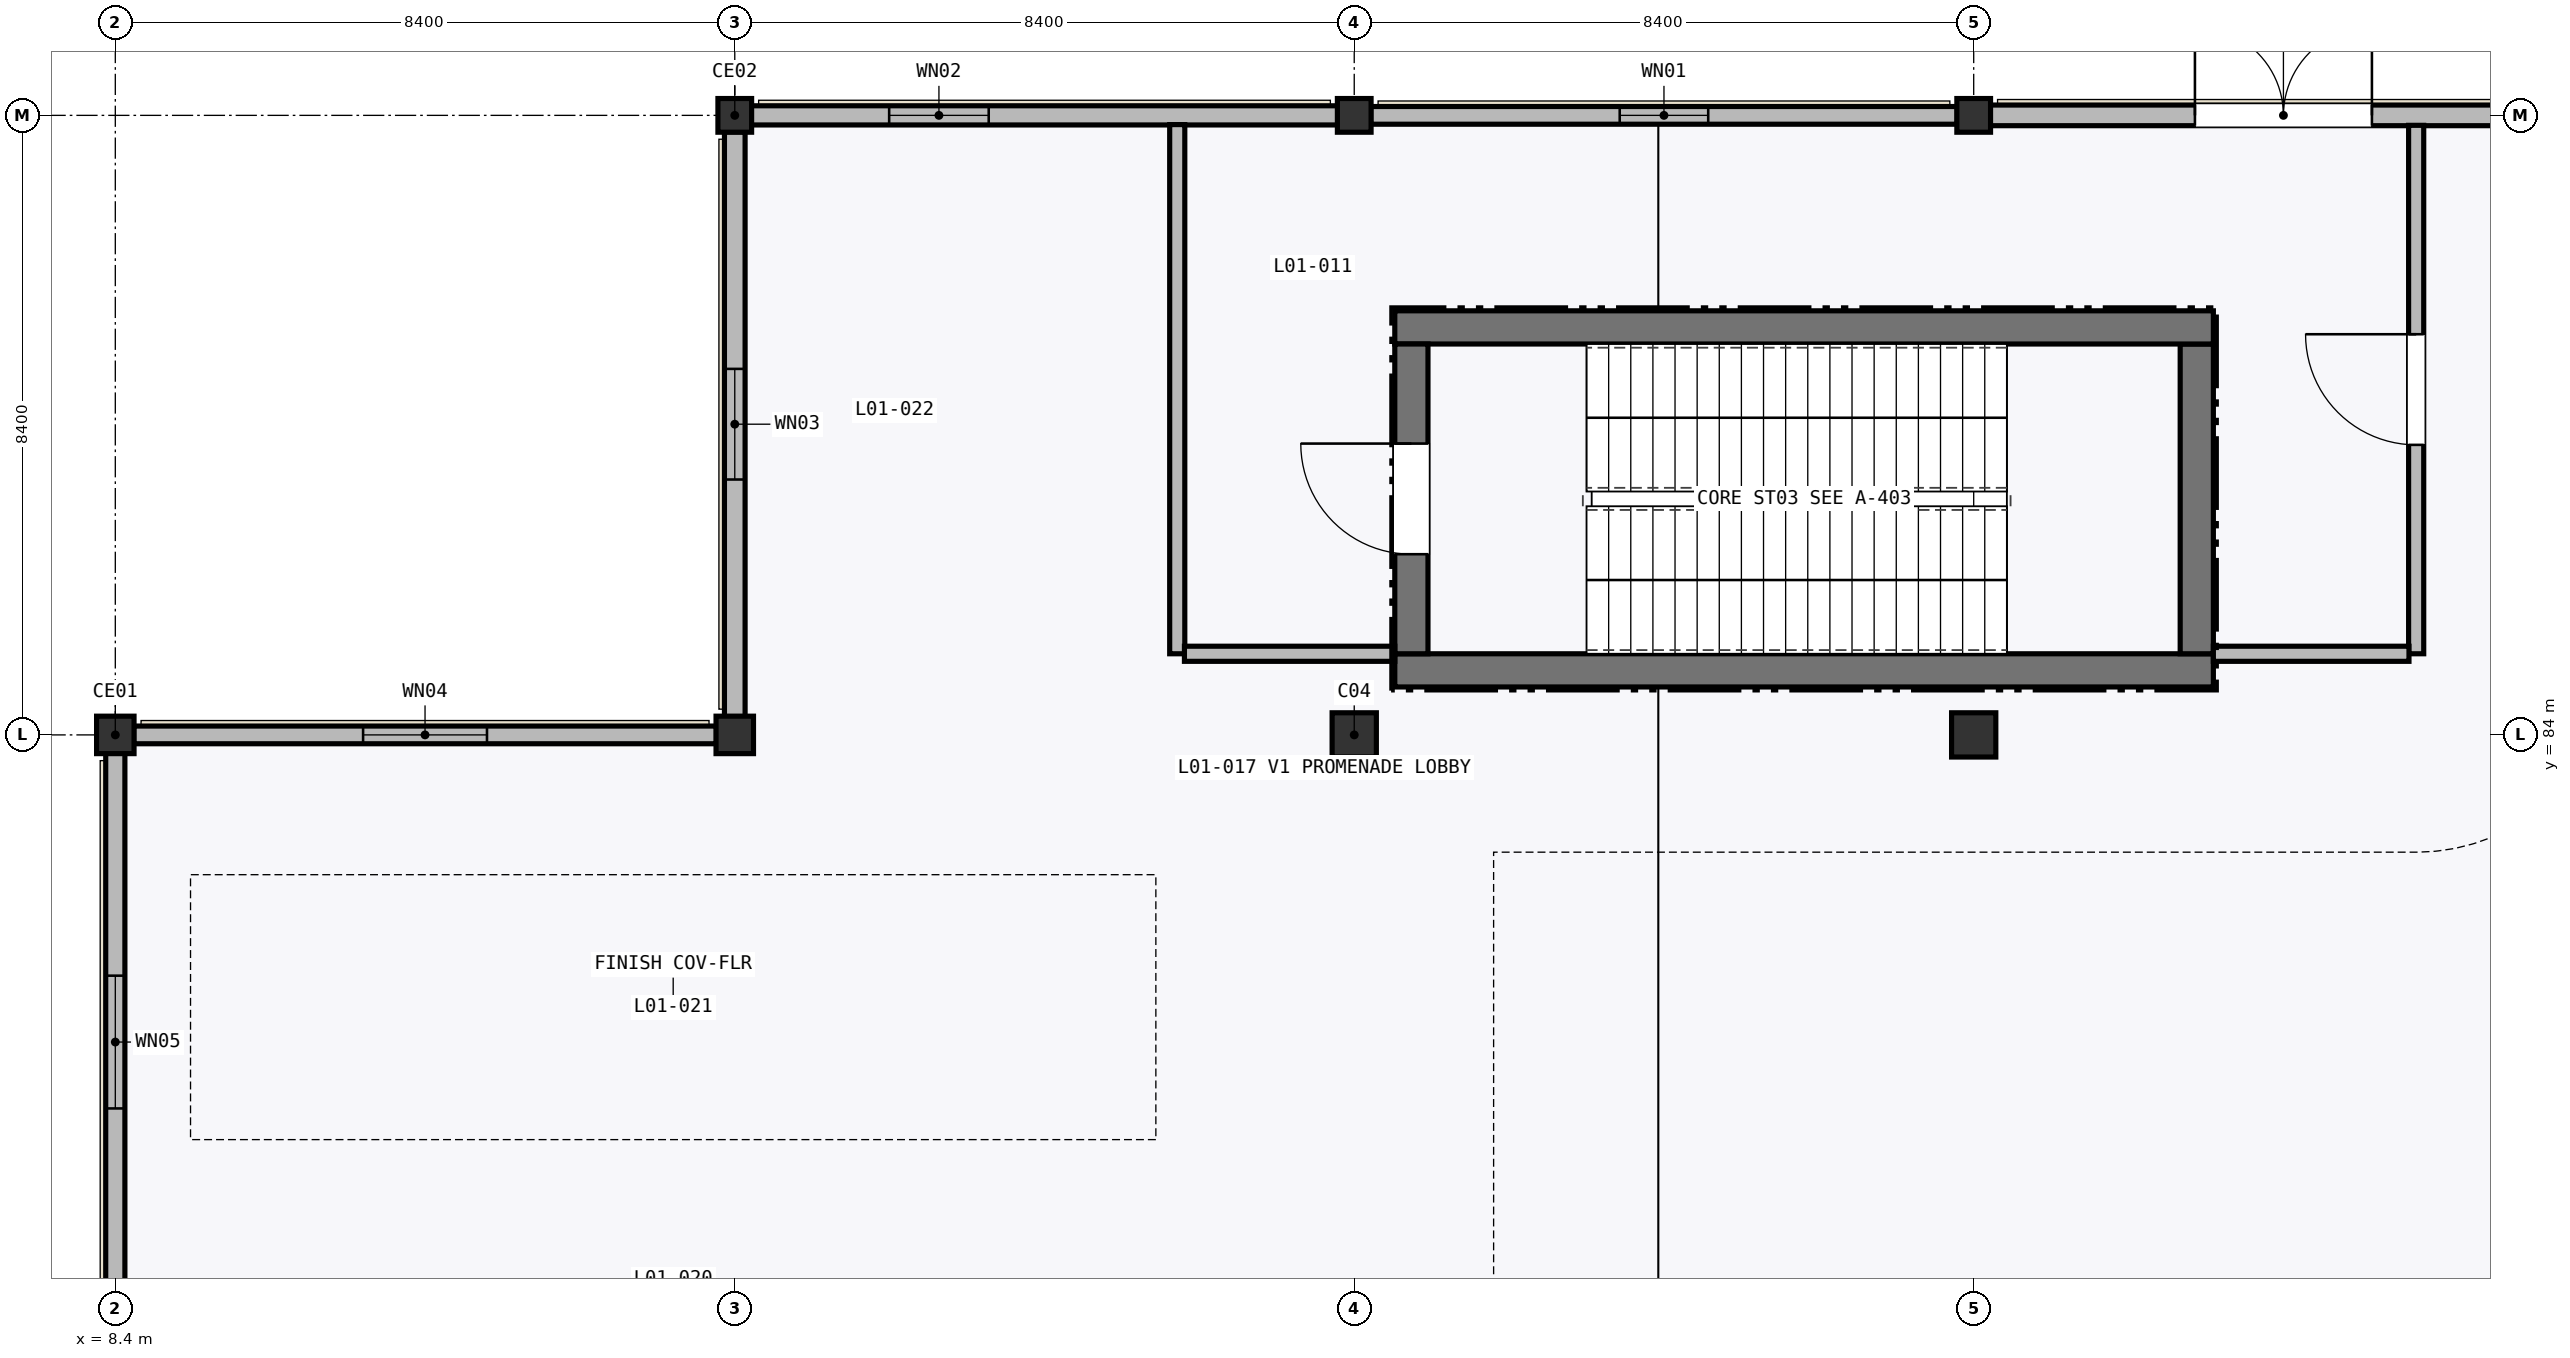
"""IFC4 building model, lengths in metres.
Left out: names, types, materials, properties, quantities, classifications, styles, units other than length and angle.
Written with IfcOpenShell. Run it as: python <this file> out.ifc"""

import sys

from ifc_helpers import new_model, si_unit, direction, frame, frame_2d, origin, origin_2d, place, context, subcontext, project, spatial, rectangle, hollow_rectangle, hollow_circle, extrude, element, fill, save


model = new_model("IFC4")
c1 = context("Model", 3, precision=1e-05, world=origin(), true_north=direction((0.0, 1.0)))
c2 = subcontext(c1, "Body", "Model", "MODEL_VIEW")
j1 = project(units=[si_unit("LENGTHUNIT", "METRE"), si_unit("PLANEANGLEUNIT", "RADIAN")], contexts=[c1])
p1 = place(None, origin())
s1 = spatial("IfcSite", under=j1, at=p1, CompositionType="ELEMENT")
p2 = place(p1, origin())
s2 = spatial("IfcBuilding", under=s1, at=p2, CompositionType="ELEMENT")
p3 = place(p2, origin())
s3 = spatial("IfcBuildingStorey", under=s2, at=p3, CompositionType="ELEMENT", Elevation=0.0)
for number, where, z_axis, x_axis in (
    (1, (8.4, 84.0, 0.0), (0.0, 0.0, 1.0), (1.0, 0.0, 0.0)),
    (2, (16.8, 84.0, 0.0), (0.0, 0.0, 1.0), (1.0, 0.0, 0.0)),
):
    element("IfcColumn", number, at=place(p3, frame(where, z_axis=z_axis, x_axis=x_axis)), inside=s3, PredefinedType="COLUMN", context=c2, shape_type="SweptSolid", body=[
        extrude(hollow_circle(Radius=0.254, WallThickness=0.016, at=origin_2d()), origin(), (0.0, 0.0, 1.0), 6.0),
    ])
p4 = place(p3, frame((16.8, 92.4, 0.0), z_axis=(0.0, 0.0, 1.0), x_axis=(1.0, 0.0, 0.0)))
e3 = element("IfcColumn", 3, at=p4, inside=s3, PredefinedType="COLUMN", context=c2, shape_type="SweptSolid", body=[
    extrude(hollow_circle(Radius=0.229, WallThickness=0.016, at=origin_2d()), origin(), (0.0, 0.0, 1.0), 6.0),
])
p5 = place(p3, frame((25.2, 84.0, 0.0), z_axis=(0.0, 0.0, 1.0), x_axis=(1.0, 0.0, 0.0)))
e4 = element("IfcColumn", 4, at=p5, inside=s3, PredefinedType="COLUMN", context=c2, shape_type="SweptSolid", body=[
    extrude(hollow_rectangle(XDim=0.6, YDim=0.6, WallThickness=0.024, at=origin_2d()), origin(), (0.0, 0.0, 1.0), 6.0),
])
p6 = place(p3, frame((25.2, 92.4, 0.0), z_axis=(0.0, 0.0, 1.0), x_axis=(1.0, 0.0, 0.0)))
e5 = element("IfcColumn", 5, at=p6, inside=s3, PredefinedType="COLUMN", context=c2, shape_type="SweptSolid", body=[
    extrude(hollow_circle(Radius=0.229, WallThickness=0.016, at=origin_2d()), origin(), (0.0, 0.0, 1.0), 6.0),
])
p7 = place(p3, frame((33.6, 84.0, 0.0), z_axis=(0.0, 0.0, 1.0), x_axis=(1.0, 0.0, 0.0)))
e6 = element("IfcColumn", 6, at=p7, inside=s3, PredefinedType="COLUMN", context=c2, shape_type="SweptSolid", body=[
    extrude(hollow_rectangle(XDim=0.6, YDim=0.6, WallThickness=0.024, at=origin_2d()), origin(), (0.0, 0.0, 1.0), 6.0),
])
p8 = place(p3, frame((33.6, 92.4, 0.0), z_axis=(0.0, 0.0, 1.0), x_axis=(1.0, 0.0, 0.0)))
e7 = element("IfcColumn", 7, at=p8, inside=s3, PredefinedType="COLUMN", context=c2, shape_type="SweptSolid", body=[
    extrude(hollow_circle(Radius=0.229, WallThickness=0.016, at=origin_2d()), origin(), (0.0, 0.0, 1.0), 6.0),
])
p9 = place(p3, frame((41.777, 92.4, 0.0), z_axis=(0.0, 0.0, 1.0), x_axis=(-1.0, 0.0, 0.0)))
e8 = element("IfcWall", 8, at=p9, inside=s3, PredefinedType="STANDARD", context=c2, shape_type="SweptSolid", body=[
    extrude(rectangle(XDim=7.953, YDim=0.28, at=frame_2d((3.977, 0.0))), origin(), (0.0, 0.0, 1.0), 5.231),
])
p10 = place(p9, frame((2.777, 0.0, 0.0)))
e9 = element("IfcOpeningElement", 9, at=p10, cuts=e8, PredefinedType="OPENING", context=c2, shape_type="SweptSolid", body=[
    extrude(rectangle(XDim=2.4, YDim=2.4, at=frame_2d((1.2, 1.2))), frame((0.0, 0.15, 0.0), z_axis=(0.0, -1.0, 0.0), x_axis=(1.0, 0.0, 0.0)), (0.0, 0.0, 1.0), 0.3),
])
p11 = place(p3, frame((33.376, 92.4, 0.0), z_axis=(0.0, 0.0, 1.0), x_axis=(-1.0, 0.0, 0.0)))
e10 = element("IfcWall", 10, at=p11, inside=s3, PredefinedType="STANDARD", context=c2, shape_type="SweptSolid", body=[
    extrude(rectangle(XDim=7.953, YDim=0.24, at=frame_2d((3.977, 0.0))), origin(), (0.0, 0.0, 1.0), 5.231),
])
p12 = place(p11, frame((3.376, 0.0, 0.95)))
e11 = element("IfcOpeningElement", 11, at=p12, cuts=e10, PredefinedType="OPENING", context=c2, shape_type="SweptSolid", body=[
    extrude(rectangle(XDim=1.2, YDim=1.8, at=frame_2d((0.6, 0.9))), frame((0.0, 0.13, 0.0), z_axis=(0.0, -1.0, 0.0), x_axis=(1.0, 0.0, 0.0)), (0.0, 0.0, 1.0), 0.26),
])
p13 = place(p3, frame((24.977, 92.4, 0.0), z_axis=(0.0, 0.0, 1.0), x_axis=(-1.0, 0.0, 0.0)))
e12 = element("IfcWall", 12, at=p13, inside=s3, PredefinedType="STANDARD", context=c2, shape_type="SweptSolid", body=[
    extrude(rectangle(XDim=7.953, YDim=0.26, at=frame_2d((3.977, 0.0))), origin(), (0.0, 0.0, 1.0), 5.231),
])
p14 = place(p13, frame((4.733, 0.0, 0.95)))
e13 = element("IfcOpeningElement", 13, at=p14, cuts=e12, PredefinedType="OPENING", context=c2, shape_type="SweptSolid", body=[
    extrude(rectangle(XDim=1.35, YDim=1.8, at=frame_2d((0.675, 0.9))), frame((0.0, 0.14, 0.0), z_axis=(0.0, -1.0, 0.0), x_axis=(1.0, 0.0, 0.0)), (0.0, 0.0, 1.0), 0.28),
])
p15 = place(p3, frame((16.8, 92.177, 0.0), z_axis=(0.0, 0.0, 1.0), x_axis=(0.0, -1.0, 0.0)))
e14 = element("IfcWall", 14, at=p15, inside=s3, PredefinedType="STANDARD", context=c2, shape_type="SweptSolid", body=[
    extrude(rectangle(XDim=7.927, YDim=0.28, at=frame_2d((3.964, 0.0))), origin(), (0.0, 0.0, 1.0), 5.231),
])
p16 = place(p15, frame((3.214, 0.0, 0.95)))
e15 = element("IfcOpeningElement", 15, at=p16, cuts=e14, PredefinedType="OPENING", context=c2, shape_type="SweptSolid", body=[
    extrude(rectangle(XDim=1.5, YDim=1.8, at=frame_2d((0.75, 0.9))), frame((0.0, 0.15, 0.0), z_axis=(0.0, -1.0, 0.0), x_axis=(1.0, 0.0, 0.0)), (0.0, 0.0, 1.0), 0.3),
])
p17 = place(p3, frame((16.551, 84.0, 0.0), z_axis=(0.0, 0.0, 1.0), x_axis=(-1.0, 0.0, 0.0)))
e16 = element("IfcWall", 16, at=p17, inside=s3, PredefinedType="STANDARD", context=c2, shape_type="SweptSolid", body=[
    extrude(rectangle(XDim=7.902, YDim=0.24, at=frame_2d((3.951, 0.0))), origin(), (0.0, 0.0, 1.0), 5.297),
])
p18 = place(p17, frame((3.111, 0.0, 0.95)))
e17 = element("IfcOpeningElement", 17, at=p18, cuts=e16, PredefinedType="OPENING", context=c2, shape_type="SweptSolid", body=[
    extrude(rectangle(XDim=1.68, YDim=1.8, at=frame_2d((0.84, 0.9))), frame((0.0, 0.13, 0.0), z_axis=(0.0, -1.0, 0.0), x_axis=(1.0, 0.0, 0.0)), (0.0, 0.0, 1.0), 0.26),
])
p19 = place(p3, frame((8.4, 83.751, 0.0), z_axis=(0.0, 0.0, 1.0), x_axis=(0.0, -1.0, 0.0)))
e18 = element("IfcWall", 18, at=p19, inside=s3, PredefinedType="STANDARD", context=c2, shape_type="SweptSolid", body=[
    extrude(rectangle(XDim=7.831, YDim=0.26, at=frame_2d((3.916, 0.0))), origin(), (0.0, 0.0, 1.0), 5.231),
])
p20 = place(p19, frame((3.015, 0.0, 0.95)))
e19 = element("IfcOpeningElement", 19, at=p20, cuts=e18, PredefinedType="OPENING", context=c2, shape_type="SweptSolid", body=[
    extrude(rectangle(XDim=1.8, YDim=1.8, at=frame_2d((0.9, 0.9))), frame((0.0, 0.14, 0.0), z_axis=(0.0, -1.0, 0.0), x_axis=(1.0, 0.0, 0.0)), (0.0, 0.0, 1.0), 0.28),
])
p21 = place(p3, frame((25.75, 84.875, 0.0), z_axis=(0.0, 0.0, 1.0), x_axis=(1.0, 0.0, 0.0)))
e20 = element("IfcWall", 20, at=p21, inside=s3, PredefinedType="SHEAR", context=c2, shape_type="SweptSolid", body=[
    extrude(rectangle(XDim=11.1, YDim=0.45, at=frame_2d((5.55, 0.0))), origin(), (0.0, 0.0, 1.0), 5.745),
])
p22 = place(p3, frame((36.625, 85.1, 0.0), z_axis=(0.0, 0.0, 1.0), x_axis=(0.0, 1.0, 0.0)))
e21 = element("IfcWall", 21, at=p22, inside=s3, PredefinedType="SHEAR", context=c2, shape_type="SweptSolid", body=[
    extrude(rectangle(XDim=4.2, YDim=0.45, at=frame_2d((2.1, 0.0))), origin(), (0.0, 0.0, 1.0), 5.745),
])
p23 = place(p3, frame((36.85, 89.525, 0.0), z_axis=(0.0, 0.0, 1.0), x_axis=(-1.0, 0.0, 0.0)))
e22 = element("IfcWall", 22, at=p23, inside=s3, PredefinedType="SHEAR", context=c2, shape_type="SweptSolid", body=[
    extrude(rectangle(XDim=11.1, YDim=0.45, at=frame_2d((5.55, 0.0))), origin(), (0.0, 0.0, 1.0), 5.745),
])
p24 = place(p3, frame((25.975, 89.3, 0.0), z_axis=(0.0, 0.0, 1.0), x_axis=(0.0, -1.0, 0.0)))
e23 = element("IfcWall", 23, at=p24, inside=s3, PredefinedType="SHEAR", context=c2, shape_type="SweptSolid", body=[
    extrude(rectangle(XDim=4.2, YDim=0.45, at=frame_2d((2.1, 0.0))), origin(), (0.0, 0.0, 1.0), 5.745),
])
p25 = place(p24, frame((1.35, 0.0, 0.0)))
e24 = element("IfcOpeningElement", 24, at=p25, cuts=e23, PredefinedType="OPENING", context=c2, shape_type="SweptSolid", body=[
    extrude(rectangle(XDim=1.5, YDim=2.15, at=frame_2d((0.75, 1.075))), frame((0.0, 0.235, 0.0), z_axis=(0.0, -1.0, 0.0), x_axis=(1.0, 0.0, 0.0)), (0.0, 0.0, 1.0), 0.47),
])
p26 = place(p3, frame((39.6, 85.1, 0.0), z_axis=(0.0, 0.0, 1.0), x_axis=(0.0, 1.0, 0.0)))
e25 = element("IfcWall", 25, at=p26, inside=s3, PredefinedType="PARTITIONING", context=c2, shape_type="SweptSolid", body=[
    extrude(rectangle(XDim=7.165, YDim=0.205, at=frame_2d((3.583, 0.0))), origin(), (0.0, 0.0, 1.0), 5.745),
])
p27 = place(p26, frame((2.833, 0.0, 0.0)))
e26 = element("IfcOpeningElement", 26, at=p27, cuts=e25, PredefinedType="OPENING", context=c2, shape_type="SweptSolid", body=[
    extrude(rectangle(XDim=1.5, YDim=2.15, at=frame_2d((0.75, 1.075))), frame((0.0, 0.113, 0.0), z_axis=(0.0, -1.0, 0.0), x_axis=(1.0, 0.0, 0.0)), (0.0, 0.0, 1.0), 0.225),
])
p28 = place(p3, frame((22.8, 92.275, 0.0), z_axis=(0.0, 0.0, 1.0), x_axis=(0.0, -1.0, 0.0)))
e27 = element("IfcWall", 27, at=p28, inside=s3, PredefinedType="PARTITIONING", context=c2, shape_type="SweptSolid", body=[
    extrude(rectangle(XDim=7.175, YDim=0.205, at=frame_2d((3.587, 0.0))), origin(), (0.0, 0.0, 1.0), 5.745),
])
p29 = place(p3, frame((22.897, 85.1, 0.0), z_axis=(0.0, 0.0, 1.0), x_axis=(1.0, 0.0, 0.0)))
e28 = element("IfcWall", 28, at=p29, inside=s3, PredefinedType="PARTITIONING", context=c2, shape_type="SweptSolid", body=[
    extrude(rectangle(XDim=2.853, YDim=0.205, at=frame_2d((1.426, 0.0))), origin(), (0.0, 0.0, 1.0), 5.745),
])
p30 = place(p3, frame((36.85, 85.1, 0.0), z_axis=(0.0, 0.0, 1.0), x_axis=(1.0, 0.0, 0.0)))
e29 = element("IfcWall", 29, at=p30, inside=s3, PredefinedType="PARTITIONING", context=c2, shape_type="SweptSolid", body=[
    extrude(rectangle(XDim=2.652, YDim=0.205, at=frame_2d((1.326, 0.0))), origin(), (0.0, 0.0, 1.0), 5.745),
])
p31 = place(p10, frame((2.4, 0.0, 0.0), z_axis=(0.0, 0.0, 1.0), x_axis=(-1.0, 0.0, 0.0)))
e30 = element("IfcDoor", 30, at=p31, inside=s3, OperationType="DOUBLE_DOOR_SINGLE_SWING", PredefinedType="DOOR", context=c2, shape_type="SweptSolid", body=[
    extrude(rectangle(XDim=2.4, YDim=2.4, at=frame_2d((1.2, 1.2))), frame((0.0, 0.025, 0.0), z_axis=(0.0, -1.0, 0.0), x_axis=(1.0, 0.0, 0.0)), (0.0, 0.0, 1.0), 0.05),
])
fill(e9, e30)
p32 = place(p12, origin())
e31 = element("IfcWindow", 31, at=p32, inside=s3, PartitioningType="SINGLE_PANEL", PredefinedType="WINDOW", context=c2, shape_type="SweptSolid", body=[
    extrude(rectangle(XDim=1.2, YDim=1.8, at=frame_2d((0.6, 0.9))), frame((0.0, 0.03, 0.0), z_axis=(0.0, -1.0, 0.0), x_axis=(1.0, 0.0, 0.0)), (0.0, 0.0, 1.0), 0.06),
])
fill(e11, e31)
p33 = place(p14, origin())
e32 = element("IfcWindow", 32, at=p33, inside=s3, PartitioningType="SINGLE_PANEL", PredefinedType="WINDOW", context=c2, shape_type="SweptSolid", body=[
    extrude(rectangle(XDim=1.35, YDim=1.8, at=frame_2d((0.675, 0.9))), frame((0.0, 0.03, 0.0), z_axis=(0.0, -1.0, 0.0), x_axis=(1.0, 0.0, 0.0)), (0.0, 0.0, 1.0), 0.06),
])
fill(e13, e32)
p34 = place(p16, origin())
e33 = element("IfcWindow", 33, at=p34, inside=s3, PartitioningType="SINGLE_PANEL", PredefinedType="WINDOW", context=c2, shape_type="SweptSolid", body=[
    extrude(rectangle(XDim=1.5, YDim=1.8, at=frame_2d((0.75, 0.9))), frame((0.0, 0.03, 0.0), z_axis=(0.0, -1.0, 0.0), x_axis=(1.0, 0.0, 0.0)), (0.0, 0.0, 1.0), 0.06),
])
fill(e15, e33)
p35 = place(p18, origin())
e34 = element("IfcWindow", 34, at=p35, inside=s3, PartitioningType="SINGLE_PANEL", PredefinedType="WINDOW", context=c2, shape_type="SweptSolid", body=[
    extrude(rectangle(XDim=1.68, YDim=1.8, at=frame_2d((0.84, 0.9))), frame((0.0, 0.03, 0.0), z_axis=(0.0, -1.0, 0.0), x_axis=(1.0, 0.0, 0.0)), (0.0, 0.0, 1.0), 0.06),
])
fill(e17, e34)
p36 = place(p20, origin())
e35 = element("IfcWindow", 35, at=p36, inside=s3, PartitioningType="SINGLE_PANEL", PredefinedType="WINDOW", context=c2, shape_type="SweptSolid", body=[
    extrude(rectangle(XDim=1.8, YDim=1.8, at=frame_2d((0.9, 0.9))), frame((0.0, 0.03, 0.0), z_axis=(0.0, -1.0, 0.0), x_axis=(1.0, 0.0, 0.0)), (0.0, 0.0, 1.0), 0.06),
])
fill(e19, e35)
p37 = place(p25, frame((1.5, 0.0, 0.0), z_axis=(0.0, 0.0, 1.0), x_axis=(-1.0, 0.0, 0.0)))
e36 = element("IfcDoor", 36, at=p37, inside=s3, OperationType="SINGLE_SWING_LEFT", PredefinedType="DOOR", context=c2, shape_type="SweptSolid", body=[
    extrude(rectangle(XDim=1.5, YDim=2.15, at=frame_2d((0.75, 1.075))), frame((0.0, 0.025, 0.0), z_axis=(0.0, -1.0, 0.0), x_axis=(1.0, 0.0, 0.0)), (0.0, 0.0, 1.0), 0.05),
])
fill(e24, e36)
p38 = place(p27, origin())
e37 = element("IfcDoor", 37, at=p38, inside=s3, OperationType="SINGLE_SWING_RIGHT", PredefinedType="DOOR", context=c2, shape_type="SweptSolid", body=[
    extrude(rectangle(XDim=1.5, YDim=2.15, at=frame_2d((0.75, 1.075))), frame((0.0, 0.025, 0.0), z_axis=(0.0, -1.0, 0.0), x_axis=(1.0, 0.0, 0.0)), (0.0, 0.0, 1.0), 0.05),
])
fill(e26, e37)
save(model, sys.argv[1])
